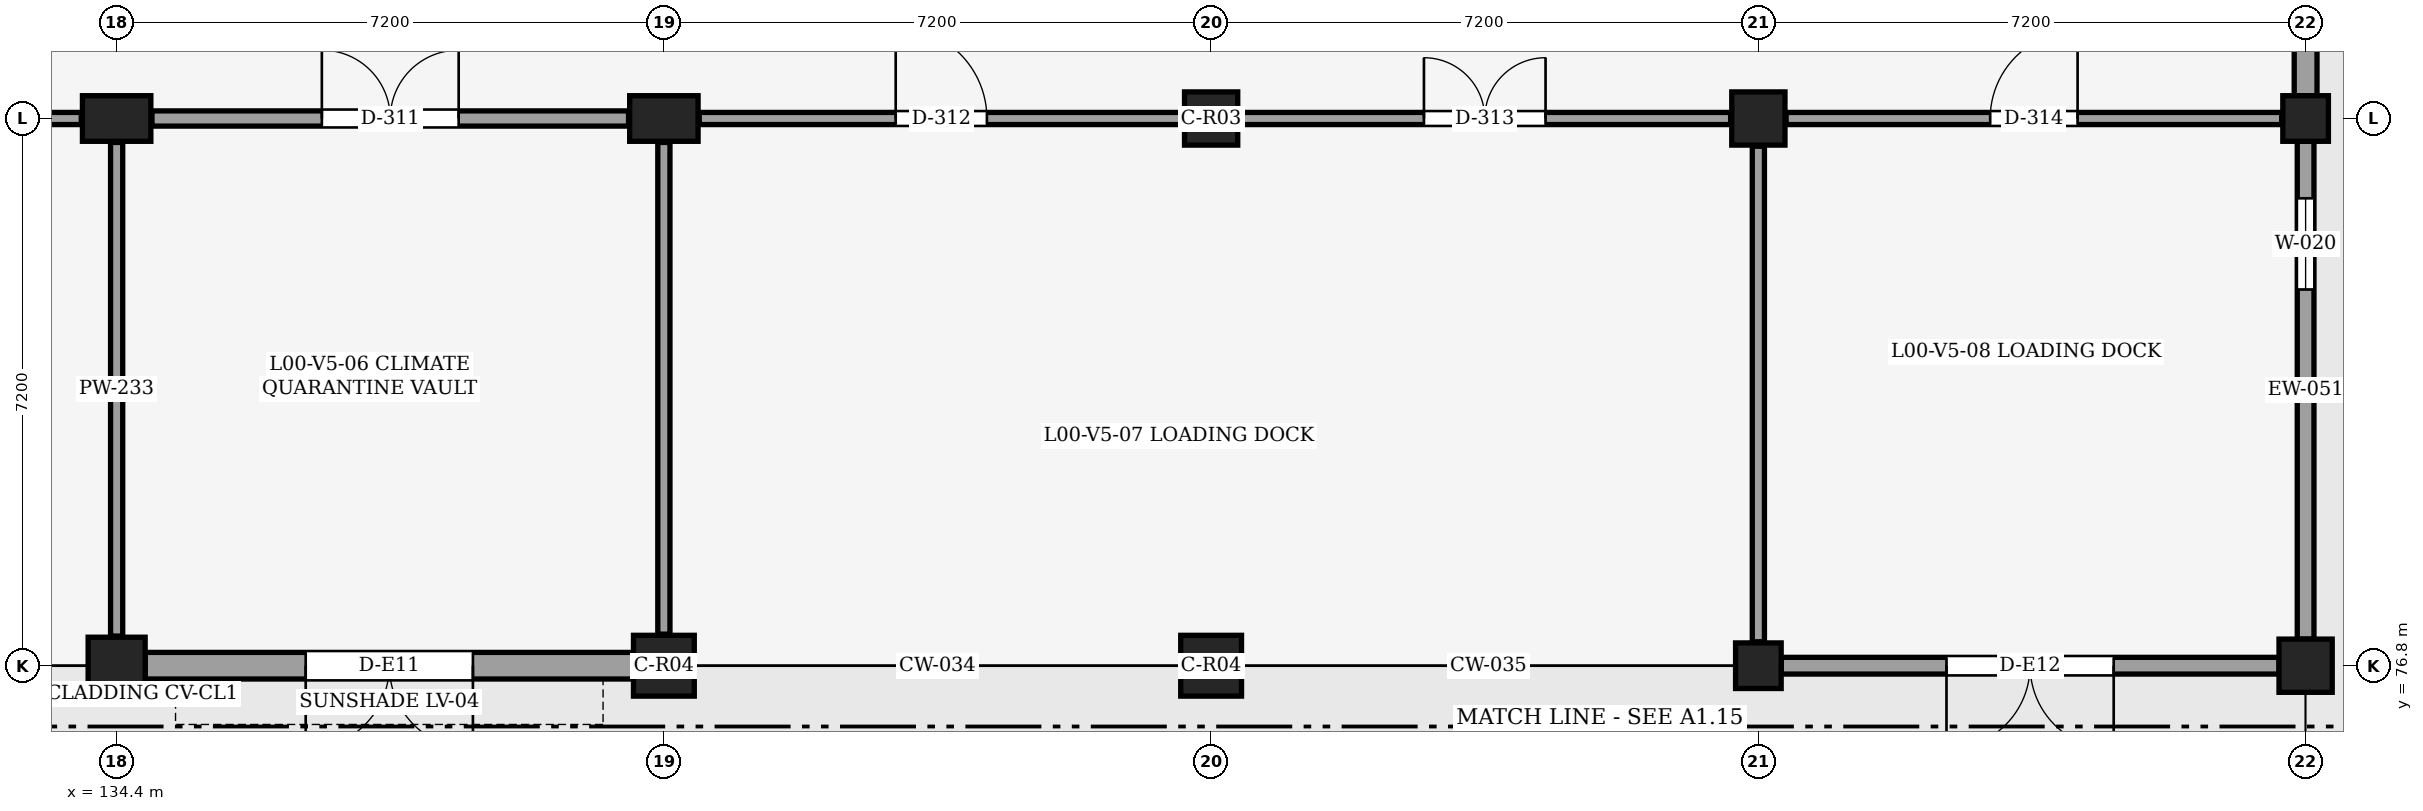
"""IFC4 building model, lengths in metres.
Left out: names, types, materials, properties, quantities, classifications, styles, units other than length and angle.
Written with IfcOpenShell. Run it as: python <this file> out.ifc"""

import sys

from ifc_helpers import new_model, si_unit, direction, frame, frame_2d, origin, origin_2d, place, context, subcontext, project, spatial, rectangle, circle, extrude, element, fill, save


model = new_model("IFC4")
c1 = context("Model", 3, precision=1e-05, world=origin(), true_north=direction((0.0, 1.0)))
c2 = subcontext(c1, "Body", "Model", "MODEL_VIEW")
j1 = project(units=[si_unit("LENGTHUNIT", "METRE"), si_unit("PLANEANGLEUNIT", "RADIAN")], contexts=[c1])
p1 = place(None, origin())
s1 = spatial("IfcSite", under=j1, at=p1, CompositionType="ELEMENT")
p2 = place(p1, origin())
s2 = spatial("IfcBuilding", under=s1, at=p2, CompositionType="ELEMENT")
p3 = place(p2, origin())
s3 = spatial("IfcBuildingStorey", under=s2, at=p3, CompositionType="ELEMENT", Elevation=0.0)
p4 = place(p3, frame((134.4, 76.8, 0.0), z_axis=(0.0, 0.0, 1.0), x_axis=(1.0, 0.0, 0.0)))
e1 = element("IfcColumn", 1, at=p4, inside=s3, PredefinedType="COLUMN", context=c2, shape_type="SweptSolid", body=[
    extrude(circle(Radius=0.375, at=origin_2d()), origin(), (0.0, 0.0, 1.0), 5.4),
])
p5 = place(p3, frame((134.4, 84.0, 0.0), z_axis=(0.0, 0.0, 1.0), x_axis=(1.0, 0.0, 0.0)))
e2 = element("IfcColumn", 2, at=p5, inside=s3, PredefinedType="COLUMN", context=c2, shape_type="SweptSolid", body=[
    extrude(rectangle(XDim=0.9, YDim=0.6, at=origin_2d()), origin(), (0.0, 0.0, 1.0), 5.4),
])
p6 = place(p3, frame((141.6, 76.8, 0.0), z_axis=(0.0, 0.0, 1.0), x_axis=(1.0, 0.0, 0.0)))
e3 = element("IfcColumn", 3, at=p6, inside=s3, PredefinedType="COLUMN", context=c2, shape_type="SweptSolid", body=[
    extrude(rectangle(XDim=0.8, YDim=0.8, at=origin_2d()), origin(), (0.0, 0.0, 1.0), 5.4),
])
p7 = place(p3, frame((141.6, 84.0, 0.0), z_axis=(0.0, 0.0, 1.0), x_axis=(1.0, 0.0, 0.0)))
e4 = element("IfcColumn", 4, at=p7, inside=s3, PredefinedType="COLUMN", context=c2, shape_type="SweptSolid", body=[
    extrude(rectangle(XDim=0.9, YDim=0.6, at=origin_2d()), origin(), (0.0, 0.0, 1.0), 5.4),
])
p8 = place(p3, frame((148.8, 76.8, 0.0), z_axis=(0.0, 0.0, 1.0), x_axis=(1.0, 0.0, 0.0)))
e5 = element("IfcColumn", 5, at=p8, inside=s3, PredefinedType="COLUMN", context=c2, shape_type="SweptSolid", body=[
    extrude(rectangle(XDim=0.8, YDim=0.8, at=origin_2d()), origin(), (0.0, 0.0, 1.0), 5.4),
])
p9 = place(p3, frame((148.8, 84.0, 0.0), z_axis=(0.0, 0.0, 1.0), x_axis=(1.0, 0.0, 0.0)))
e6 = element("IfcColumn", 6, at=p9, inside=s3, PredefinedType="COLUMN", context=c2, shape_type="SweptSolid", body=[
    extrude(rectangle(XDim=0.7, YDim=0.7, at=origin_2d()), origin(), (0.0, 0.0, 1.0), 5.4),
])
p10 = place(p3, frame((156.0, 76.8, 0.0), z_axis=(0.0, 0.0, 1.0), x_axis=(1.0, 0.0, 0.0)))
e7 = element("IfcColumn", 7, at=p10, inside=s3, PredefinedType="COLUMN", context=c2, shape_type="SweptSolid", body=[
    extrude(rectangle(XDim=0.6, YDim=0.6, at=origin_2d()), origin(), (0.0, 0.0, 1.0), 5.4),
])
for number, where, z_axis, x_axis in (
    (8, (156.0, 84.0, 0.0), (0.0, 0.0, 1.0), (1.0, 0.0, 0.0)),
    (9, (163.2, 76.8, 0.0), (0.0, 0.0, 1.0), (1.0, 0.0, 0.0)),
):
    element("IfcColumn", number, at=place(p3, frame(where, z_axis=z_axis, x_axis=x_axis)), inside=s3, PredefinedType="COLUMN", context=c2, shape_type="SweptSolid", body=[
        extrude(rectangle(XDim=0.7, YDim=0.7, at=origin_2d()), origin(), (0.0, 0.0, 1.0), 5.4),
    ])
p11 = place(p3, frame((163.2, 84.0, 0.0), z_axis=(0.0, 0.0, 1.0), x_axis=(1.0, 0.0, 0.0)))
e10 = element("IfcColumn", 10, at=p11, inside=s3, PredefinedType="COLUMN", context=c2, shape_type="SweptSolid", body=[
    extrude(rectangle(XDim=0.6, YDim=0.6, at=origin_2d()), origin(), (0.0, 0.0, 1.0), 5.4),
])
p12 = place(p3, frame((141.2, 76.8, 0.0), z_axis=(0.0, 0.0, 1.0), x_axis=(-1.0, 0.0, 0.0)))
e11 = element("IfcWall", 11, at=p12, inside=s3, PredefinedType="SOLIDWALL", context=c2, shape_type="SweptSolid", body=[
    extrude(rectangle(XDim=6.425, YDim=0.35, at=frame_2d((3.212, 0.0))), origin(), (0.0, 0.0, 1.0), 4.531),
])
p13 = place(p12, frame((2.113, 0.0, 0.0)))
e12 = element("IfcOpeningElement", 12, at=p13, cuts=e11, PredefinedType="OPENING", context=c2, shape_type="SweptSolid", body=[
    extrude(rectangle(XDim=2.2, YDim=2.4, at=frame_2d((1.1, 1.2))), frame((0.0, 0.185, 0.0), z_axis=(0.0, -1.0, 0.0), x_axis=(1.0, 0.0, 0.0)), (0.0, 0.0, 1.0), 0.371),
])
p14 = place(p3, frame((162.85, 76.8, 0.0), z_axis=(0.0, 0.0, 1.0), x_axis=(-1.0, 0.0, 0.0)))
e13 = element("IfcWall", 13, at=p14, inside=s3, PredefinedType="SOLIDWALL", context=c2, shape_type="SweptSolid", body=[
    extrude(rectangle(XDim=6.55, YDim=0.22, at=frame_2d((3.275, 0.0))), origin(), (0.0, 0.0, 1.0), 4.533),
])
p15 = place(p14, frame((2.175, 0.0, 0.0)))
e14 = element("IfcOpeningElement", 14, at=p15, cuts=e13, PredefinedType="OPENING", context=c2, shape_type="SweptSolid", body=[
    extrude(rectangle(XDim=2.2, YDim=2.4, at=frame_2d((1.1, 1.2))), frame((0.0, 0.12, 0.0), z_axis=(0.0, -1.0, 0.0), x_axis=(1.0, 0.0, 0.0)), (0.0, 0.0, 1.0), 0.24),
])
p16 = place(p3, frame((163.2, 83.7, 0.0), z_axis=(0.0, 0.0, 1.0), x_axis=(0.0, -1.0, 0.0)))
e15 = element("IfcWall", 15, at=p16, inside=s3, PredefinedType="SOLIDWALL", context=c2, shape_type="SweptSolid", body=[
    extrude(rectangle(XDim=6.55, YDim=0.22, at=frame_2d((3.275, 0.0))), origin(), (0.0, 0.0, 1.0), 4.54),
])
p17 = place(p16, frame((0.75, 0.0, 0.9)))
e16 = element("IfcOpeningElement", 16, at=p17, cuts=e15, PredefinedType="OPENING", context=c2, shape_type="SweptSolid", body=[
    extrude(rectangle(XDim=1.2, YDim=1.5, at=frame_2d((0.6, 0.75))), frame((0.0, 0.12, 0.0), z_axis=(0.0, -1.0, 0.0), x_axis=(1.0, 0.0, 0.0)), (0.0, 0.0, 1.0), 0.24),
])
p18 = place(p3, frame((163.2, 90.85, 0.0), z_axis=(0.0, 0.0, 1.0), x_axis=(0.0, -1.0, 0.0)))
e17 = element("IfcWall", 17, at=p18, inside=s3, PredefinedType="SOLIDWALL", context=c2, shape_type="SweptSolid", body=[
    extrude(rectangle(XDim=6.55, YDim=0.3, at=frame_2d((3.275, 0.0))), origin(), (0.0, 0.0, 1.0), 4.44),
])
p19 = place(p18, frame((1.175, 0.0, 0.0)))
e18 = element("IfcOpeningElement", 18, at=p19, cuts=e17, PredefinedType="OPENING", context=c2, shape_type="SweptSolid", body=[
    extrude(rectangle(XDim=4.2, YDim=3.85, at=frame_2d((2.1, 1.925))), frame((0.0, 0.16, 0.0), z_axis=(0.0, -1.0, 0.0), x_axis=(1.0, 0.0, 0.0)), (0.0, 0.0, 1.0), 0.321),
])
p20 = place(p3, frame((127.59, 84.0, 0.0), z_axis=(0.0, 0.0, 1.0), x_axis=(1.0, 0.0, 0.0)))
e19 = element("IfcWall", 19, at=p20, inside=s3, PredefinedType="PARTITIONING", context=c2, shape_type="SweptSolid", body=[
    extrude(rectangle(XDim=6.345, YDim=0.16, at=frame_2d((3.172, 0.0))), origin(), (0.0, 0.0, 1.0), 4.531),
])
p21 = place(p20, frame((2.123, 0.0, 0.0)))
e20 = element("IfcOpeningElement", 20, at=p21, cuts=e19, PredefinedType="OPENING", context=c2, shape_type="SweptSolid", body=[
    extrude(rectangle(XDim=2.1, YDim=2.5, at=frame_2d((1.05, 1.25))), frame((0.0, 0.09, 0.0), z_axis=(0.0, -1.0, 0.0), x_axis=(1.0, 0.0, 0.0)), (0.0, 0.0, 1.0), 0.18),
])
p22 = place(p3, frame((134.4, 77.19, 0.0), z_axis=(0.0, 0.0, 1.0), x_axis=(0.0, 1.0, 0.0)))
e21 = element("IfcWall", 21, at=p22, inside=s3, PredefinedType="PARTITIONING", context=c2, shape_type="SweptSolid", body=[
    extrude(rectangle(XDim=6.495, YDim=0.16, at=frame_2d((3.248, 0.0))), origin(), (0.0, 0.0, 1.0), 4.48),
])
p23 = place(p3, frame((134.865, 84.0, 0.0), z_axis=(0.0, 0.0, 1.0), x_axis=(1.0, 0.0, 0.0)))
e22 = element("IfcWall", 22, at=p23, inside=s3, PredefinedType="PARTITIONING", context=c2, shape_type="SweptSolid", body=[
    extrude(rectangle(XDim=6.27, YDim=0.2, at=frame_2d((3.135, 0.0))), origin(), (0.0, 0.0, 1.0), 4.547),
])
p24 = place(p23, frame((2.235, 0.0, 0.0)))
e23 = element("IfcOpeningElement", 23, at=p24, cuts=e22, PredefinedType="OPENING", context=c2, shape_type="SweptSolid", body=[
    extrude(rectangle(XDim=1.8, YDim=2.4, at=frame_2d((0.9, 1.2))), frame((0.0, 0.11, 0.0), z_axis=(0.0, -1.0, 0.0), x_axis=(1.0, 0.0, 0.0)), (0.0, 0.0, 1.0), 0.22),
])
p25 = place(p3, frame((141.6, 77.215, 0.0), z_axis=(0.0, 0.0, 1.0), x_axis=(0.0, 1.0, 0.0)))
e24 = element("IfcWall", 24, at=p25, inside=s3, PredefinedType="PARTITIONING", context=c2, shape_type="SweptSolid", body=[
    extrude(rectangle(XDim=6.47, YDim=0.16, at=frame_2d((3.235, 0.0))), origin(), (0.0, 0.0, 1.0), 4.38),
])
p26 = place(p3, frame((142.065, 84.0, 0.0), z_axis=(0.0, 0.0, 1.0), x_axis=(1.0, 0.0, 0.0)))
e25 = element("IfcWall", 25, at=p26, inside=s3, PredefinedType="PARTITIONING", context=c2, shape_type="SweptSolid", body=[
    extrude(rectangle(XDim=6.37, YDim=0.16, at=frame_2d((3.185, 0.0))), origin(), (0.0, 0.0, 1.0), 4.618),
])
p27 = place(p26, frame((2.585, 0.0, 0.0)))
e26 = element("IfcOpeningElement", 26, at=p27, cuts=e25, PredefinedType="OPENING", context=c2, shape_type="SweptSolid", body=[
    extrude(rectangle(XDim=1.2, YDim=2.2, at=frame_2d((0.6, 1.1))), frame((0.0, 0.09, 0.0), z_axis=(0.0, -1.0, 0.0), x_axis=(1.0, 0.0, 0.0)), (0.0, 0.0, 1.0), 0.18),
])
p28 = place(p3, frame((149.165, 84.0, 0.0), z_axis=(0.0, 0.0, 1.0), x_axis=(1.0, 0.0, 0.0)))
e27 = element("IfcWall", 27, at=p28, inside=s3, PredefinedType="PARTITIONING", context=c2, shape_type="SweptSolid", body=[
    extrude(rectangle(XDim=6.47, YDim=0.16, at=frame_2d((3.235, 0.0))), origin(), (0.0, 0.0, 1.0), 4.473),
])
p29 = place(p28, frame((2.435, 0.0, 0.0)))
e28 = element("IfcOpeningElement", 28, at=p29, cuts=e27, PredefinedType="OPENING", context=c2, shape_type="SweptSolid", body=[
    extrude(rectangle(XDim=1.6, YDim=2.35, at=frame_2d((0.8, 1.175))), frame((0.0, 0.09, 0.0), z_axis=(0.0, -1.0, 0.0), x_axis=(1.0, 0.0, 0.0)), (0.0, 0.0, 1.0), 0.18),
])
p30 = place(p3, frame((156.0, 77.115, 0.0), z_axis=(0.0, 0.0, 1.0), x_axis=(0.0, 1.0, 0.0)))
e29 = element("IfcWall", 29, at=p30, inside=s3, PredefinedType="PARTITIONING", context=c2, shape_type="SweptSolid", body=[
    extrude(rectangle(XDim=6.52, YDim=0.16, at=frame_2d((3.26, 0.0))), origin(), (0.0, 0.0, 1.0), 4.54),
])
p31 = place(p3, frame((156.365, 84.0, 0.0), z_axis=(0.0, 0.0, 1.0), x_axis=(1.0, 0.0, 0.0)))
e30 = element("IfcWall", 30, at=p31, inside=s3, PredefinedType="PARTITIONING", context=c2, shape_type="SweptSolid", body=[
    extrude(rectangle(XDim=6.52, YDim=0.16, at=frame_2d((3.26, 0.0))), origin(), (0.0, 0.0, 1.0), 4.591),
])
p32 = place(p31, frame((2.685, 0.0, 0.0)))
e31 = element("IfcOpeningElement", 31, at=p32, cuts=e30, PredefinedType="OPENING", context=c2, shape_type="SweptSolid", body=[
    extrude(rectangle(XDim=1.15, YDim=2.2, at=frame_2d((0.575, 1.1))), frame((0.0, 0.09, 0.0), z_axis=(0.0, -1.0, 0.0), x_axis=(1.0, 0.0, 0.0)), (0.0, 0.0, 1.0), 0.18),
])
p33 = place(p13, origin())
e32 = element("IfcDoor", 32, at=p33, inside=s3, OperationType="DOUBLE_DOOR_SINGLE_SWING", PredefinedType="DOOR", context=c2, shape_type="SweptSolid", body=[
    extrude(rectangle(XDim=2.2, YDim=2.4, at=frame_2d((1.1, 1.2))), frame((0.0, 0.025, 0.0), z_axis=(0.0, -1.0, 0.0), x_axis=(1.0, 0.0, 0.0)), (0.0, 0.0, 1.0), 0.05),
])
fill(e12, e32)
p34 = place(p15, origin())
e33 = element("IfcDoor", 33, at=p34, inside=s3, OperationType="DOUBLE_DOOR_SINGLE_SWING", PredefinedType="DOOR", context=c2, shape_type="SweptSolid", body=[
    extrude(rectangle(XDim=2.2, YDim=2.4, at=frame_2d((1.1, 1.2))), frame((0.0, 0.025, 0.0), z_axis=(0.0, -1.0, 0.0), x_axis=(1.0, 0.0, 0.0)), (0.0, 0.0, 1.0), 0.05),
])
fill(e14, e33)
p35 = place(p17, origin())
e34 = element("IfcWindow", 34, at=p35, inside=s3, PartitioningType="SINGLE_PANEL", PredefinedType="WINDOW", context=c2, shape_type="SweptSolid", body=[
    extrude(rectangle(XDim=1.2, YDim=1.5, at=frame_2d((0.6, 0.75))), frame((0.0, 0.03, 0.0), z_axis=(0.0, -1.0, 0.0), x_axis=(1.0, 0.0, 0.0)), (0.0, 0.0, 1.0), 0.06),
])
fill(e16, e34)
p36 = place(p24, origin())
e35 = element("IfcDoor", 35, at=p36, inside=s3, OperationType="DOUBLE_DOOR_SINGLE_SWING", PredefinedType="DOOR", context=c2, shape_type="SweptSolid", body=[
    extrude(rectangle(XDim=1.8, YDim=2.4, at=frame_2d((0.9, 1.2))), frame((0.0, 0.025, 0.0), z_axis=(0.0, -1.0, 0.0), x_axis=(1.0, 0.0, 0.0)), (0.0, 0.0, 1.0), 0.05),
])
fill(e23, e35)
p37 = place(p27, origin())
e36 = element("IfcDoor", 36, at=p37, inside=s3, OperationType="SINGLE_SWING_LEFT", PredefinedType="DOOR", context=c2, shape_type="SweptSolid", body=[
    extrude(rectangle(XDim=1.2, YDim=2.2, at=frame_2d((0.6, 1.1))), frame((0.0, 0.025, 0.0), z_axis=(0.0, -1.0, 0.0), x_axis=(1.0, 0.0, 0.0)), (0.0, 0.0, 1.0), 0.05),
])
fill(e26, e36)
p38 = place(p29, origin())
e37 = element("IfcDoor", 37, at=p38, inside=s3, OperationType="DOUBLE_DOOR_SINGLE_SWING", PredefinedType="DOOR", context=c2, shape_type="SweptSolid", body=[
    extrude(rectangle(XDim=1.6, YDim=2.35, at=frame_2d((0.8, 1.175))), frame((0.0, 0.025, 0.0), z_axis=(0.0, -1.0, 0.0), x_axis=(1.0, 0.0, 0.0)), (0.0, 0.0, 1.0), 0.05),
])
fill(e28, e37)
p39 = place(p32, origin())
e38 = element("IfcDoor", 38, at=p39, inside=s3, OperationType="SINGLE_SWING_RIGHT", PredefinedType="DOOR", context=c2, shape_type="SweptSolid", body=[
    extrude(rectangle(XDim=1.15, YDim=2.2, at=frame_2d((0.575, 1.1))), frame((0.0, 0.025, 0.0), z_axis=(0.0, -1.0, 0.0), x_axis=(1.0, 0.0, 0.0)), (0.0, 0.0, 1.0), 0.05),
])
fill(e31, e38)
save(model, sys.argv[1])
